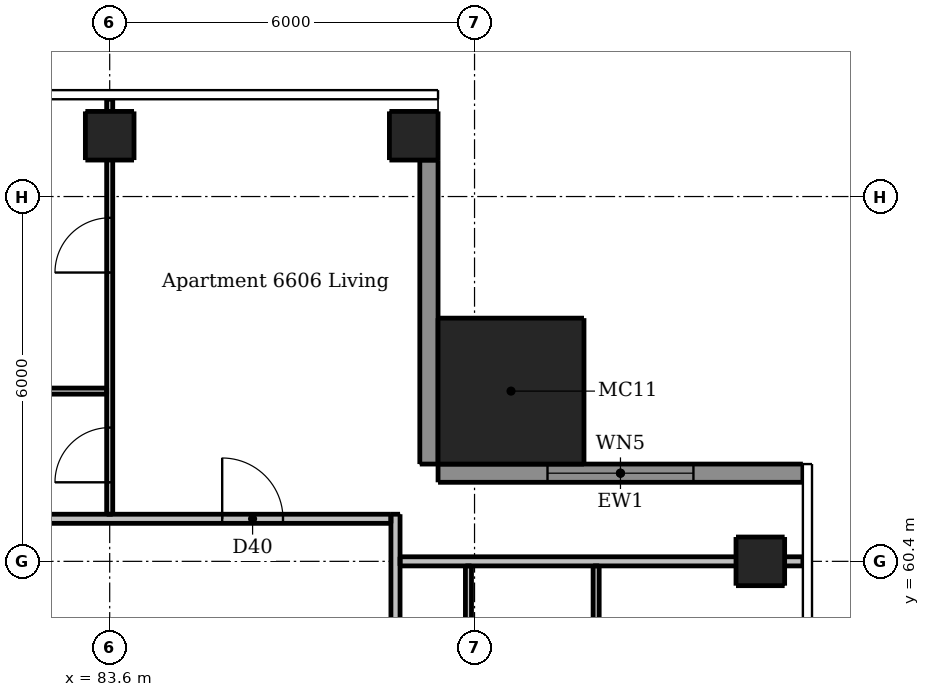
"""IFC4 building model, lengths in metres.
Left out: names, types, materials, properties, quantities, classifications, styles, units other than length and angle.
Written with IfcOpenShell. Run it as: python <this file> out.ifc"""

import sys

from ifc_helpers import new_model, si_unit, direction, frame, frame_2d, origin, origin_2d, place, context, subcontext, project, spatial, rectangle, extrude, element, fill, save


model = new_model("IFC4")
c1 = context("Model", 3, precision=1e-05, world=origin(), true_north=direction((0.0, 1.0)))
c2 = subcontext(c1, "Body", "Model", "MODEL_VIEW")
j1 = project(units=[si_unit("LENGTHUNIT", "METRE"), si_unit("PLANEANGLEUNIT", "RADIAN")], contexts=[c1])
p1 = place(None, origin())
s1 = spatial("IfcSite", under=j1, at=p1, CompositionType="ELEMENT")
p2 = place(p1, origin())
s2 = spatial("IfcBuilding", under=s1, at=p2, CompositionType="ELEMENT")
p3 = place(p2, frame((0.0, 0.0, 248.8)))
s3 = spatial("IfcBuildingStorey", under=s2, at=p3, CompositionType="ELEMENT", Elevation=248.8)
for number, where, z_axis, x_axis in (
    (1, (94.3, 60.4, 0.0), (0.0, 0.0, 1.0), (1.0, 0.0, 0.0)),
    (2, (83.6, 67.4, 0.0), (0.0, 0.0, 1.0), (1.0, 0.0, 0.0)),
    (3, (88.6, 67.4, 0.0), (0.0, 0.0, 1.0), (1.0, 0.0, 0.0)),
):
    element("IfcColumn", number, at=place(p3, frame(where, z_axis=z_axis, x_axis=x_axis)), inside=s3, PredefinedType="COLUMN", context=c2, shape_type="SweptSolid", body=[
        extrude(rectangle(XDim=0.8, YDim=0.8, at=origin_2d()), origin(), (0.0, 0.0, 1.0), 3.05),
    ])
p4 = place(p3, frame((90.2, 63.2, 0.0), z_axis=(0.0, 0.0, 1.0), x_axis=(1.0, 0.0, 0.0)))
e4 = element("IfcColumn", 4, at=p4, inside=s3, PredefinedType="COLUMN", context=c2, shape_type="SweptSolid", body=[
    extrude(rectangle(XDim=2.4, YDim=2.4, at=origin_2d()), origin(), (0.0, 0.0, 1.0), 3.3),
])
p5 = place(p3, frame((95.0, 61.85, 0.0), z_axis=(0.0, 0.0, 1.0), x_axis=(-1.0, 0.0, 0.0)))
e5 = element("IfcWall", 5, at=p5, inside=s3, PredefinedType="SOLIDWALL", context=c2, shape_type="SweptSolid", body=[
    extrude(rectangle(XDim=6.0, YDim=0.3, at=frame_2d((3.0, 0.0))), origin(), (0.0, 0.0, 1.0), 3.05),
])
p6 = place(p5, frame((1.8, 0.0, 0.15)))
e6 = element("IfcOpeningElement", 6, at=p6, cuts=e5, PredefinedType="OPENING", context=c2, shape_type="SweptSolid", body=[
    extrude(rectangle(XDim=2.4, YDim=2.1, at=frame_2d((1.2, 1.05))), frame((0.0, 0.16, 0.0), z_axis=(0.0, -1.0, 0.0), x_axis=(1.0, 0.0, 0.0)), (0.0, 0.0, 1.0), 0.32),
])
p7 = place(p3, frame((88.85, 62.0, 0.0), z_axis=(0.0, 0.0, 1.0), x_axis=(0.0, 1.0, 0.0)))
e7 = element("IfcWall", 7, at=p7, inside=s3, PredefinedType="SOLIDWALL", context=c2, shape_type="SweptSolid", body=[
    extrude(rectangle(XDim=5.0, YDim=0.3, at=frame_2d((2.5, 0.0))), origin(), (0.0, 0.0, 1.0), 3.05),
])
p8 = place(p3, frame((83.6, 61.175, 0.0), z_axis=(0.0, 0.0, 1.0), x_axis=(0.0, 1.0, 0.0)))
e8 = element("IfcWall", 8, at=p8, inside=s3, PredefinedType="PARTITIONING", context=c2, shape_type="SweptSolid", body=[
    extrude(rectangle(XDim=6.825, YDim=0.1, at=frame_2d((3.413, 0.0))), origin(), (0.0, 0.0, 1.0), 2.516),
])
p9 = place(p8, frame((0.525, 0.0, 0.0)))
e9 = element("IfcOpeningElement", 9, at=p9, cuts=e8, PredefinedType="OPENING", context=c2, shape_type="SweptSolid", body=[
    extrude(rectangle(XDim=0.9, YDim=2.1, at=frame_2d((0.45, 1.05))), frame((0.0, 0.06, 0.0), z_axis=(0.0, -1.0, 0.0), x_axis=(1.0, 0.0, 0.0)), (0.0, 0.0, 1.0), 0.12),
])
p10 = place(p8, frame((3.975, 0.0, 0.0)))
e10 = element("IfcOpeningElement", 10, at=p10, cuts=e8, PredefinedType="OPENING", context=c2, shape_type="SweptSolid", body=[
    extrude(rectangle(XDim=0.9, YDim=2.1, at=frame_2d((0.45, 1.05))), frame((0.0, 0.06, 0.0), z_axis=(0.0, -1.0, 0.0), x_axis=(1.0, 0.0, 0.0)), (0.0, 0.0, 1.0), 0.12),
])
p11 = place(p3, frame((89.5, 60.325, 0.0), z_axis=(0.0, 0.0, 1.0), x_axis=(0.0, -1.0, 0.0)))
e11 = element("IfcWall", 11, at=p11, inside=s3, PredefinedType="PARTITIONING", context=c2, shape_type="SweptSolid", body=[
    extrude(rectangle(XDim=17.85, YDim=0.1, at=frame_2d((8.925, 0.0))), origin(), (0.0, 0.0, 1.0), 3.05),
])
p12 = place(p11, frame((6.975, 0.0, 0.0)))
e12 = element("IfcOpeningElement", 12, at=p12, cuts=e11, PredefinedType="OPENING", context=c2, shape_type="SweptSolid", body=[
    extrude(rectangle(XDim=0.9, YDim=2.1, at=frame_2d((0.45, 1.05))), frame((0.0, 0.06, 0.0), z_axis=(0.0, -1.0, 0.0), x_axis=(1.0, 0.0, 0.0)), (0.0, 0.0, 1.0), 0.12),
])
p13 = place(p11, frame((0.975, 0.0, 0.0)))
e13 = element("IfcOpeningElement", 13, at=p13, cuts=e11, PredefinedType="OPENING", context=c2, shape_type="SweptSolid", body=[
    extrude(rectangle(XDim=0.9, YDim=2.1, at=frame_2d((0.45, 1.05))), frame((0.0, 0.06, 0.0), z_axis=(0.0, -1.0, 0.0), x_axis=(1.0, 0.0, 0.0)), (0.0, 0.0, 1.0), 0.12),
])
p14 = place(p11, frame((15.675, 0.0, 0.0)))
e14 = element("IfcOpeningElement", 14, at=p14, cuts=e11, PredefinedType="OPENING", context=c2, shape_type="SweptSolid", body=[
    extrude(rectangle(XDim=0.9, YDim=2.1, at=frame_2d((0.45, 1.05))), frame((0.0, 0.06, 0.0), z_axis=(0.0, -1.0, 0.0), x_axis=(1.0, 0.0, 0.0)), (0.0, 0.0, 1.0), 0.12),
])
p15 = place(p11, frame((12.725, 0.0, 0.0)))
e15 = element("IfcOpeningElement", 15, at=p15, cuts=e11, PredefinedType="OPENING", context=c2, shape_type="SweptSolid", body=[
    extrude(rectangle(XDim=0.8, YDim=2.1, at=frame_2d((0.4, 1.05))), frame((0.0, 0.06, 0.0), z_axis=(0.0, -1.0, 0.0), x_axis=(1.0, 0.0, 0.0)), (0.0, 0.0, 1.0), 0.12),
])
p16 = place(p3, frame((91.6, 57.35, 0.0), z_axis=(0.0, 0.0, 1.0), x_axis=(0.0, 1.0, 0.0)))
e16 = element("IfcWall", 16, at=p16, inside=s3, PredefinedType="PARTITIONING", context=c2, shape_type="SweptSolid", body=[
    extrude(rectangle(XDim=2.975, YDim=0.1, at=frame_2d((1.487, 0.0))), origin(), (0.0, 0.0, 1.0), 3.05),
])
p17 = place(p3, frame((83.55, 63.2, 0.0), z_axis=(0.0, 0.0, 1.0), x_axis=(-1.0, 0.0, 0.0)))
e17 = element("IfcWall", 17, at=p17, inside=s3, PredefinedType="PARTITIONING", context=c2, shape_type="SweptSolid", body=[
    extrude(rectangle(XDim=5.875, YDim=0.1, at=frame_2d((2.938, 0.0))), origin(), (0.0, 0.0, 1.0), 3.05),
])
p18 = place(p17, frame((3.75, 0.0, 0.0)))
e18 = element("IfcOpeningElement", 18, at=p18, cuts=e17, PredefinedType="OPENING", context=c2, shape_type="SweptSolid", body=[
    extrude(rectangle(XDim=0.8, YDim=2.1, at=frame_2d((0.4, 1.05))), frame((0.0, 0.06, 0.0), z_axis=(0.0, -1.0, 0.0), x_axis=(1.0, 0.0, 0.0)), (0.0, 0.0, 1.0), 0.12),
])
p19 = place(p3, frame((88.3, 61.175, 0.0), z_axis=(0.0, 0.0, 1.0), x_axis=(0.0, -1.0, 0.0)))
e19 = element("IfcWall", 19, at=p19, inside=s3, PredefinedType="PARTITIONING", context=c2, shape_type="SweptSolid", body=[
    extrude(rectangle(XDim=29.4, YDim=0.15, at=frame_2d((14.7, 0.0))), origin(), (0.0, 0.0, 1.0), 3.05),
])
p20 = place(p19, frame((27.025, 0.0, 0.0)))
e20 = element("IfcOpeningElement", 20, at=p20, cuts=e19, PredefinedType="OPENING", context=c2, shape_type="SweptSolid", body=[
    extrude(rectangle(XDim=1.0, YDim=2.1, at=frame_2d((0.5, 1.05))), frame((0.0, 0.085, 0.0), z_axis=(0.0, -1.0, 0.0), x_axis=(1.0, 0.0, 0.0)), (0.0, 0.0, 1.0), 0.17),
])
p21 = place(p19, frame((9.275, 0.0, 0.0)))
e21 = element("IfcOpeningElement", 21, at=p21, cuts=e19, PredefinedType="OPENING", context=c2, shape_type="SweptSolid", body=[
    extrude(rectangle(XDim=1.0, YDim=2.1, at=frame_2d((0.5, 1.05))), frame((0.0, 0.085, 0.0), z_axis=(0.0, -1.0, 0.0), x_axis=(1.0, 0.0, 0.0)), (0.0, 0.0, 1.0), 0.17),
])
p22 = place(p3, frame((58.975, 61.1, 0.0), z_axis=(0.0, 0.0, 1.0), x_axis=(1.0, 0.0, 0.0)))
e22 = element("IfcWall", 22, at=p22, inside=s3, PredefinedType="PARTITIONING", context=c2, shape_type="SweptSolid", body=[
    extrude(rectangle(XDim=29.25, YDim=0.15, at=frame_2d((14.625, 0.0))), origin(), (0.0, 0.0, 1.0), 3.05),
])
p23 = place(p22, frame((9.125, 0.0, 0.0)))
e23 = element("IfcOpeningElement", 23, at=p23, cuts=e22, PredefinedType="OPENING", context=c2, shape_type="SweptSolid", body=[
    extrude(rectangle(XDim=1.0, YDim=2.1, at=frame_2d((0.5, 1.05))), frame((0.0, 0.085, 0.0), z_axis=(0.0, -1.0, 0.0), x_axis=(1.0, 0.0, 0.0)), (0.0, 0.0, 1.0), 0.17),
])
p24 = place(p22, frame((26.475, 0.0, 0.0)))
e24 = element("IfcOpeningElement", 24, at=p24, cuts=e22, PredefinedType="OPENING", context=c2, shape_type="SweptSolid", body=[
    extrude(rectangle(XDim=1.0, YDim=2.1, at=frame_2d((0.5, 1.05))), frame((0.0, 0.085, 0.0), z_axis=(0.0, -1.0, 0.0), x_axis=(1.0, 0.0, 0.0)), (0.0, 0.0, 1.0), 0.17),
])
p25 = place(p3, frame((88.375, 60.4, 0.0), z_axis=(0.0, 0.0, 1.0), x_axis=(1.0, 0.0, 0.0)))
e25 = element("IfcWall", 25, at=p25, inside=s3, PredefinedType="PARTITIONING", context=c2, shape_type="SweptSolid", body=[
    extrude(rectangle(XDim=6.625, YDim=0.15, at=frame_2d((3.312, 0.0))), origin(), (0.0, 0.0, 1.0), 2.647),
])
p26 = place(p6, origin())
e26 = element("IfcWindow", 26, at=p26, inside=s3, PartitioningType="DOUBLE_PANEL_VERTICAL", PredefinedType="WINDOW", context=c2, shape_type="SweptSolid", body=[
    extrude(rectangle(XDim=2.4, YDim=2.1, at=frame_2d((1.2, 1.05))), frame((0.0, 0.03, 0.0), z_axis=(0.0, -1.0, 0.0), x_axis=(1.0, 0.0, 0.0)), (0.0, 0.0, 1.0), 0.06),
])
fill(e6, e26)
p27 = place(p24, origin())
e27 = element("IfcDoor", 27, at=p27, inside=s3, OperationType="SINGLE_SWING_LEFT", PredefinedType="DOOR", context=c2, shape_type="SweptSolid", body=[
    extrude(rectangle(XDim=1.0, YDim=2.1, at=frame_2d((0.5, 1.05))), frame((0.0, 0.025, 0.0), z_axis=(0.0, -1.0, 0.0), x_axis=(1.0, 0.0, 0.0)), (0.0, 0.0, 1.0), 0.05),
])
fill(e24, e27)
p28 = place(p9, origin())
e28 = element("IfcDoor", 28, at=p28, inside=s3, OperationType="SINGLE_SWING_LEFT", PredefinedType="DOOR", context=c2, shape_type="SweptSolid", body=[
    extrude(rectangle(XDim=0.9, YDim=2.1, at=frame_2d((0.45, 1.05))), frame((0.0, 0.025, 0.0), z_axis=(0.0, -1.0, 0.0), x_axis=(1.0, 0.0, 0.0)), (0.0, 0.0, 1.0), 0.05),
])
fill(e9, e28)
p29 = place(p10, origin())
e29 = element("IfcDoor", 29, at=p29, inside=s3, OperationType="SINGLE_SWING_LEFT", PredefinedType="DOOR", context=c2, shape_type="SweptSolid", body=[
    extrude(rectangle(XDim=0.9, YDim=2.1, at=frame_2d((0.45, 1.05))), frame((0.0, 0.025, 0.0), z_axis=(0.0, -1.0, 0.0), x_axis=(1.0, 0.0, 0.0)), (0.0, 0.0, 1.0), 0.05),
])
fill(e10, e29)
save(model, sys.argv[1])
